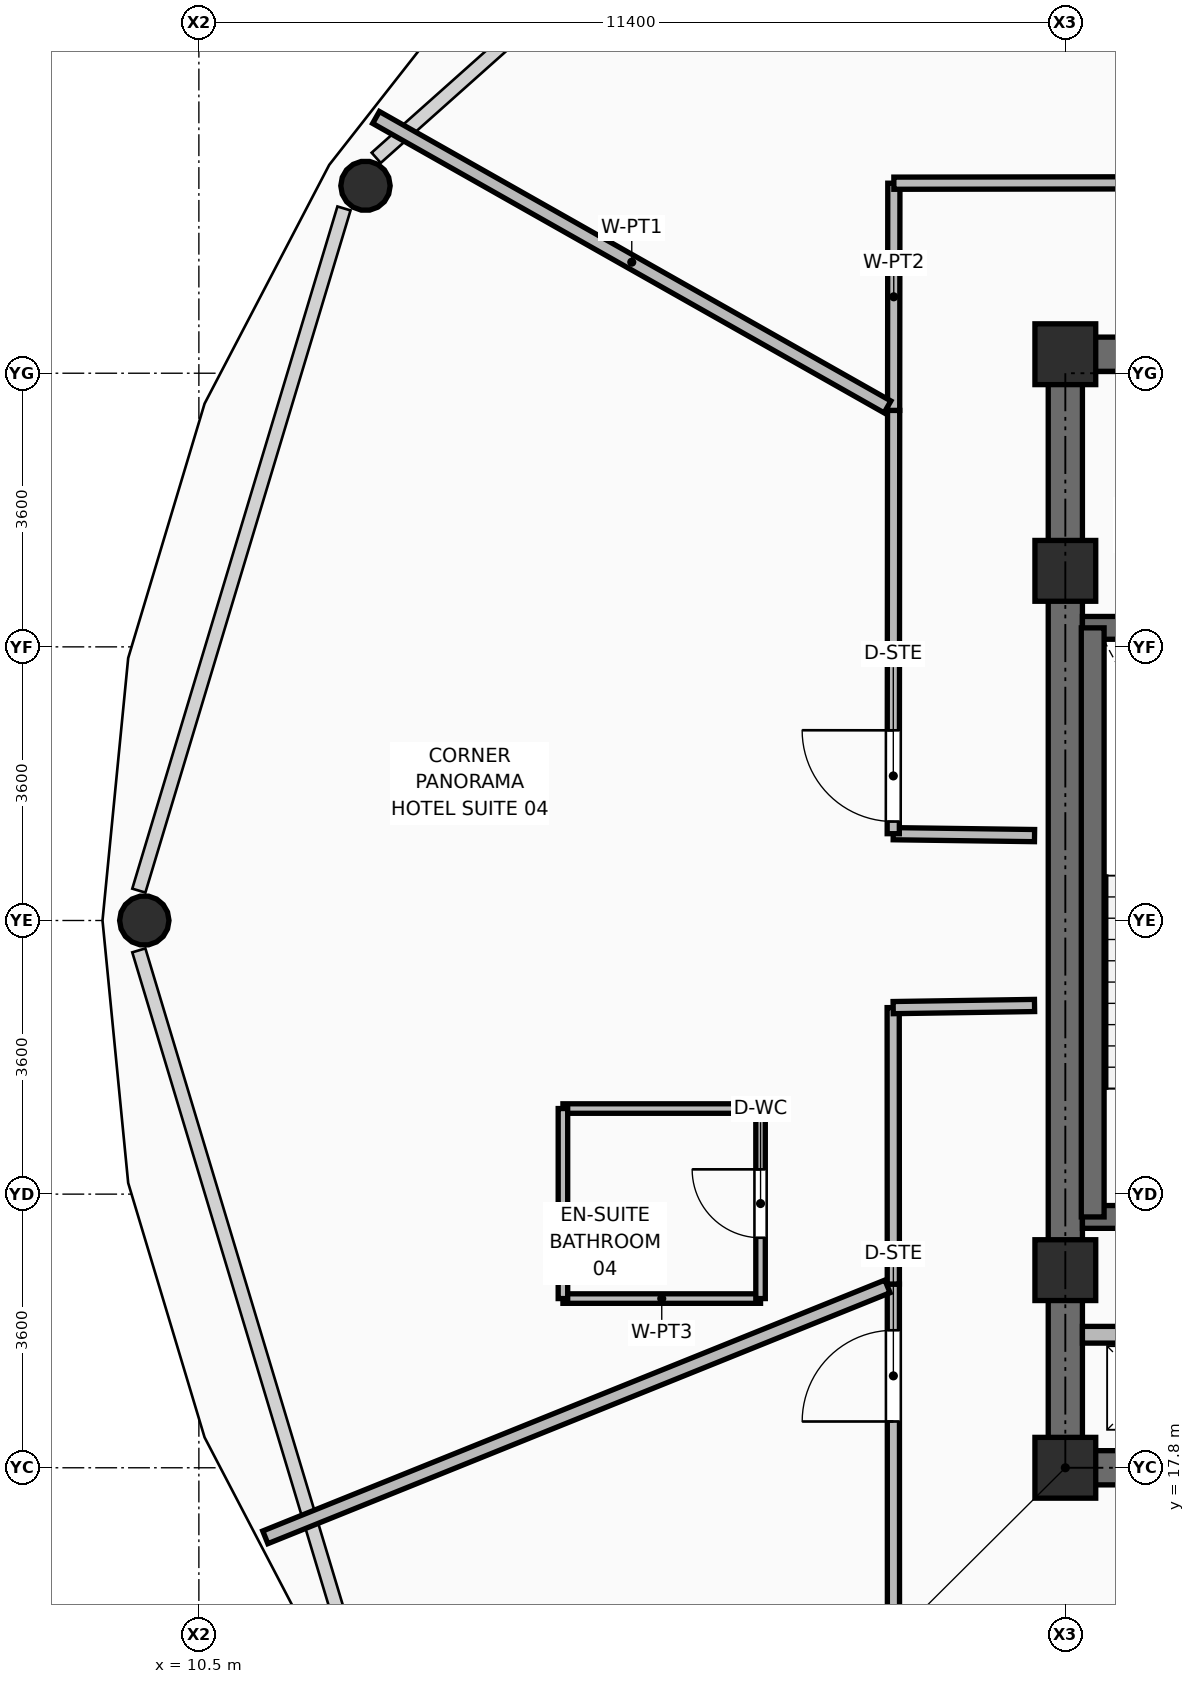
"""IFC4 building model, lengths in metres.
Left out: names, types, materials, properties, quantities, classifications, styles, units other than length and angle.
Written with IfcOpenShell. Run it as: python <this file> out.ifc"""

import sys

from ifc_helpers import new_model, si_unit, direction, frame, frame_2d, origin, origin_2d, place, context, subcontext, project, spatial, rectangle, hollow_circle, extrude, element, fill, save


model = new_model("IFC4")
c1 = context("Model", 3, precision=1e-05, world=origin(), true_north=direction((0.0, 1.0)))
c2 = subcontext(c1, "Body", "Model", "MODEL_VIEW")
j1 = project(units=[si_unit("LENGTHUNIT", "METRE"), si_unit("PLANEANGLEUNIT", "RADIAN")], contexts=[c1])
p1 = place(None, origin())
s1 = spatial("IfcSite", under=j1, at=p1, CompositionType="ELEMENT")
p2 = place(p1, origin())
s2 = spatial("IfcBuilding", under=s1, at=p2, CompositionType="ELEMENT")
p3 = place(p2, frame((0.0, 0.0, 242.4)))
s3 = spatial("IfcBuildingStorey", under=s2, at=p3, CompositionType="ELEMENT", Elevation=242.4)
for number, where, z_axis, x_axis in (
    (1, (21.9, 17.8, 0.0), (0.0, 0.0, 1.0), (1.0, 0.0, 0.0)),
    (2, (21.9, 20.4, 0.0), (0.0, 0.0, 1.0), (1.0, 0.0, 0.0)),
    (3, (21.9, 29.6, 0.0), (0.0, 0.0, 1.0), (1.0, 0.0, 0.0)),
    (4, (21.9, 32.45, 0.0), (0.0, 0.0, 1.0), (1.0, 0.0, 0.0)),
):
    element("IfcColumn", number, at=place(p3, frame(where, z_axis=z_axis, x_axis=x_axis)), inside=s3, PredefinedType="COLUMN", context=c2, shape_type="SweptSolid", body=[
        extrude(rectangle(XDim=0.8, YDim=0.8, at=origin_2d()), origin(), (0.0, 0.0, 1.0), 3.75),
    ])
for number, where, z_axis, x_axis in (
    (5, (12.692, 34.666, 0.0), (0.0, 0.0, 1.0), (1.0, 0.0, 0.0)),
    (6, (9.782, 25.0, 0.0), (0.0, 0.0, 1.0), (1.0, 0.0, 0.0)),
):
    element("IfcColumn", number, at=place(p3, frame(where, z_axis=z_axis, x_axis=x_axis)), inside=s3, PredefinedType="COLUMN", context=c2, shape_type="SweptSolid", body=[
        extrude(hollow_circle(Radius=0.325, WallThickness=0.03, at=origin_2d()), origin(), (0.0, 0.0, 1.0), 3.57),
    ])
p4 = place(p3, frame((21.675, 17.8, 0.0), z_axis=(0.0, 0.0, 1.0), x_axis=(1.0, 0.0, 0.0)))
e7 = element("IfcWall", 7, at=p4, inside=s3, PredefinedType="SHEAR", context=c2, shape_type="SweptSolid", body=[
    extrude(rectangle(XDim=2.075, YDim=0.45, at=frame_2d((1.038, 0.0))), origin(), (0.0, 0.0, 1.0), 3.57),
])
p5 = place(p3, frame((21.675, 32.45, 0.0), z_axis=(0.0, 0.0, 1.0), x_axis=(1.0, 0.0, 0.0)))
e8 = element("IfcWall", 8, at=p5, inside=s3, PredefinedType="SHEAR", context=c2, shape_type="SweptSolid", body=[
    extrude(rectangle(XDim=19.65, YDim=0.45, at=frame_2d((9.825, 0.0))), origin(), (0.0, 0.0, 1.0), 3.57),
])
p6 = place(p5, frame((2.075, 0.0, 0.0)))
e9 = element("IfcOpeningElement", 9, at=p6, cuts=e8, PredefinedType="OPENING", context=c2, shape_type="SweptSolid", body=[
    extrude(rectangle(XDim=1.1, YDim=2.1, at=frame_2d((0.55, 1.05))), frame((0.0, 0.235, 0.0), z_axis=(0.0, -1.0, 0.0), x_axis=(1.0, 0.0, 0.0)), (0.0, 0.0, 1.0), 0.47),
])
p7 = place(p5, frame((15.465, 0.0, 0.0)))
e10 = element("IfcOpeningElement", 10, at=p7, cuts=e8, PredefinedType="OPENING", context=c2, shape_type="SweptSolid", body=[
    extrude(rectangle(XDim=1.0, YDim=2.1, at=frame_2d((0.5, 1.05))), frame((0.0, 0.235, 0.0), z_axis=(0.0, -1.0, 0.0), x_axis=(1.0, 0.0, 0.0)), (0.0, 0.0, 1.0), 0.47),
])
p8 = place(p5, frame((17.475, 0.0, 0.0)))
e11 = element("IfcOpeningElement", 11, at=p8, cuts=e8, PredefinedType="OPENING", context=c2, shape_type="SweptSolid", body=[
    extrude(rectangle(XDim=0.9, YDim=2.1, at=frame_2d((0.45, 1.05))), frame((0.0, 0.235, 0.0), z_axis=(0.0, -1.0, 0.0), x_axis=(1.0, 0.0, 0.0)), (0.0, 0.0, 1.0), 0.47),
])
p9 = place(p3, frame((21.9, 18.025, 0.0), z_axis=(0.0, 0.0, 1.0), x_axis=(0.0, 1.0, 0.0)))
e12 = element("IfcWall", 12, at=p9, inside=s3, PredefinedType="SHEAR", context=c2, shape_type="SweptSolid", body=[
    extrude(rectangle(XDim=14.2, YDim=0.45, at=frame_2d((7.1, 0.0))), origin(), (0.0, 0.0, 1.0), 3.57),
])
p10 = place(p3, frame((22.125, 21.1, 0.0), z_axis=(0.0, 0.0, 1.0), x_axis=(1.0, 0.0, 0.0)))
e13 = element("IfcWall", 13, at=p10, inside=s3, PredefinedType="SHEAR", context=c2, shape_type="SweptSolid", body=[
    extrude(rectangle(XDim=3.615, YDim=0.3, at=frame_2d((1.808, 0.0))), origin(), (0.0, 0.0, 1.0), 3.57),
])
p11 = place(p10, frame((2.095, 0.0, 0.0)))
e14 = element("IfcOpeningElement", 14, at=p11, cuts=e13, PredefinedType="OPENING", context=c2, shape_type="SweptSolid", body=[
    extrude(rectangle(XDim=1.05, YDim=2.1, at=frame_2d((0.525, 1.05))), frame((0.0, 0.16, 0.0), z_axis=(0.0, -1.0, 0.0), x_axis=(1.0, 0.0, 0.0)), (0.0, 0.0, 1.0), 0.32),
])
p12 = place(p3, frame((22.125, 28.85, 0.0), z_axis=(0.0, 0.0, 1.0), x_axis=(1.0, 0.0, 0.0)))
e15 = element("IfcWall", 15, at=p12, inside=s3, PredefinedType="SHEAR", context=c2, shape_type="SweptSolid", body=[
    extrude(rectangle(XDim=3.615, YDim=0.3, at=frame_2d((1.808, 0.0))), origin(), (0.0, 0.0, 1.0), 3.57),
])
p13 = place(p3, frame((22.26, 21.1, 0.0), z_axis=(0.0, 0.0, 1.0), x_axis=(0.0, 1.0, 0.0)))
e16 = element("IfcWall", 16, at=p13, inside=s3, PredefinedType="SHEAR", context=c2, shape_type="SweptSolid", body=[
    extrude(rectangle(XDim=7.75, YDim=0.3, at=frame_2d((3.875, 0.0))), origin(), (0.0, 0.0, 1.0), 3.57),
])
p14 = place(p3, frame((22.125, 19.55, 0.0), z_axis=(0.0, 0.0, 1.0), x_axis=(1.0, 0.0, 0.0)))
e17 = element("IfcWall", 17, at=p14, inside=s3, PredefinedType="PARTITIONING", context=c2, shape_type="SweptSolid", body=[
    extrude(rectangle(XDim=1.665, YDim=0.22, at=frame_2d((0.833, 0.0))), origin(), (0.0, 0.0, 1.0), 2.595),
])
p15 = place(p3, frame((21.495, 26.117, 0.0), z_axis=(0.0, 0.0, 1.0), x_axis=(-0.999908537082, 0.013524698532, 0.0)))
e18 = element("IfcWall", 18, at=p15, inside=s3, PredefinedType="PARTITIONING", context=c2, shape_type="SweptSolid", body=[
    extrude(rectangle(XDim=1.859, YDim=0.16, at=frame_2d((0.93, 0.0))), origin(), (0.0, 0.0, 1.0), 2.595),
])
p16 = place(p3, frame((19.636, 26.142, 0.0), z_axis=(0.0, 0.0, 1.0), x_axis=(0.000920648448, 0.999999576203, 0.0)))
e19 = element("IfcWall", 19, at=p16, inside=s3, PredefinedType="PARTITIONING", context=c2, shape_type="SweptSolid", body=[
    extrude(rectangle(XDim=5.569, YDim=0.16, at=frame_2d((2.784, 0.0))), origin(), (0.0, 0.0, 1.0), 3.55),
])
p17 = place(p16, frame((0.16, 0.0, 0.0)))
e20 = element("IfcOpeningElement", 20, at=p17, cuts=e19, PredefinedType="OPENING", context=c2, shape_type="SweptSolid", body=[
    extrude(rectangle(XDim=1.2, YDim=2.1, at=frame_2d((0.6, 1.05))), frame((0.0, 0.09, 0.0), z_axis=(0.0, -1.0, 0.0), x_axis=(1.0, 0.0, 0.0)), (0.0, 0.0, 1.0), 0.18),
])
p18 = place(p3, frame((19.641, 31.711, 0.0), z_axis=(0.0, 0.0, 1.0), x_axis=(0.000980151453, 0.999999519651, 0.0)))
e21 = element("IfcWall", 21, at=p18, inside=s3, PredefinedType="PARTITIONING", context=c2, shape_type="SweptSolid", body=[
    extrude(rectangle(XDim=2.989, YDim=0.16, at=frame_2d((1.495, 0.0))), origin(), (0.0, 0.0, 1.0), 3.081),
])
p19 = place(p3, frame((19.644, 34.7, 0.0), z_axis=(0.0, 0.0, 1.0), x_axis=(0.999998989417, 0.001421677005, 0.0)))
e22 = element("IfcWall", 22, at=p19, inside=s3, PredefinedType="PARTITIONING", context=c2, shape_type="SweptSolid", body=[
    extrude(rectangle(XDim=5.667, YDim=0.16, at=frame_2d((2.833, 0.0))), origin(), (0.0, 0.0, 1.0), 3.081),
])
p20 = place(p19, frame((3.863, 0.0, 0.0)))
e23 = element("IfcOpeningElement", 23, at=p20, cuts=e22, PredefinedType="OPENING", context=c2, shape_type="SweptSolid", body=[
    extrude(rectangle(XDim=1.2, YDim=2.1, at=frame_2d((0.6, 1.05))), frame((0.0, 0.09, 0.0), z_axis=(0.0, -1.0, 0.0), x_axis=(1.0, 0.0, 0.0)), (0.0, 0.0, 1.0), 0.18),
])
p21 = place(p3, frame((19.64, 12.271, 0.0), z_axis=(0.0, 0.0, 1.0), x_axis=(-0.000368697551, 0.999999932031, 0.0)))
e24 = element("IfcWall", 24, at=p21, inside=s3, PredefinedType="PARTITIONING", context=c2, shape_type="SweptSolid", body=[
    extrude(rectangle(XDim=7.946, YDim=0.16, at=frame_2d((3.973, 0.0))), origin(), (0.0, 0.0, 1.0), 3.081),
])
p22 = place(p21, frame((6.138, 0.0, 0.0)))
e25 = element("IfcOpeningElement", 25, at=p22, cuts=e24, PredefinedType="OPENING", context=c2, shape_type="SweptSolid", body=[
    extrude(rectangle(XDim=1.2, YDim=2.1, at=frame_2d((0.6, 1.05))), frame((0.0, 0.09, 0.0), z_axis=(0.0, -1.0, 0.0), x_axis=(1.0, 0.0, 0.0)), (0.0, 0.0, 1.0), 0.18),
])
p23 = place(p3, frame((19.637, 20.217, 0.0), z_axis=(0.0, 0.0, 1.0), x_axis=(-0.000537020799, 0.999999855804, 0.0)))
e26 = element("IfcWall", 26, at=p23, inside=s3, PredefinedType="PARTITIONING", context=c2, shape_type="SweptSolid", body=[
    extrude(rectangle(XDim=3.637, YDim=0.16, at=frame_2d((1.818, 0.0))), origin(), (0.0, 0.0, 1.0), 3.081),
])
p24 = place(p3, frame((19.635, 23.854, 0.0), z_axis=(0.0, 0.0, 1.0), x_axis=(0.999886107392, 0.015092125259, 0.0)))
e27 = element("IfcWall", 27, at=p24, inside=s3, PredefinedType="PARTITIONING", context=c2, shape_type="SweptSolid", body=[
    extrude(rectangle(XDim=1.86, YDim=0.16, at=frame_2d((0.93, 0.0))), origin(), (0.0, 0.0, 1.0), 2.595),
])
p25 = place(p3, frame((25.259, 34.79, 0.0), z_axis=(0.0, 0.0, 1.0), x_axis=(-0.537619190812, 0.843187764185, 0.0)))
e28 = element("IfcWall", 28, at=p25, inside=s3, PredefinedType="PARTITIONING", context=c2, shape_type="SweptSolid", body=[
    extrude(rectangle(XDim=8.77, YDim=0.18, at=frame_2d((4.385, 0.0))), origin(), (0.0, 0.0, 1.0), 2.925),
])
p26 = place(p3, frame((19.56, 31.757, 0.0), z_axis=(0.0, 0.0, 1.0), x_axis=(-0.870312783113, 0.492499400559, 0.0)))
e29 = element("IfcWall", 29, at=p26, inside=s3, PredefinedType="PARTITIONING", context=c2, shape_type="SweptSolid", body=[
    extrude(rectangle(XDim=7.732, YDim=0.18, at=frame_2d((3.866, 0.0))), origin(), (0.0, 0.0, 1.0), 2.925),
])
p27 = place(p3, frame((19.56, 20.186, 0.0), z_axis=(0.0, 0.0, 1.0), x_axis=(-0.927433425778, -0.37398828959, 0.0)))
e30 = element("IfcWall", 30, at=p27, inside=s3, PredefinedType="PARTITIONING", context=c2, shape_type="SweptSolid", body=[
    extrude(rectangle(XDim=8.827, YDim=0.18, at=frame_2d((4.413, 0.0))), origin(), (0.0, 0.0, 1.0), 2.925),
])
p28 = place(p3, frame((15.29, 20.026, 0.0), z_axis=(0.0, 0.0, 1.0), x_axis=(1.0, 0.0, 0.0)))
e31 = element("IfcWall", 31, at=p28, inside=s3, PredefinedType="PARTITIONING", context=c2, shape_type="SweptSolid", body=[
    extrude(rectangle(XDim=2.6, YDim=0.125, at=frame_2d((1.3, 0.0))), origin(), (0.0, 0.0, 1.0), 3.55),
])
p29 = place(p3, frame((15.29, 22.526, 0.0), z_axis=(0.0, 0.0, 1.0), x_axis=(1.0, 0.0, 0.0)))
e32 = element("IfcWall", 32, at=p29, inside=s3, PredefinedType="PARTITIONING", context=c2, shape_type="SweptSolid", body=[
    extrude(rectangle(XDim=2.6, YDim=0.125, at=frame_2d((1.3, 0.0))), origin(), (0.0, 0.0, 1.0), 3.081),
])
p30 = place(p3, frame((15.29, 20.026, 0.0), z_axis=(0.0, 0.0, 1.0), x_axis=(0.0, 1.0, 0.0)))
e33 = element("IfcWall", 33, at=p30, inside=s3, PredefinedType="PARTITIONING", context=c2, shape_type="SweptSolid", body=[
    extrude(rectangle(XDim=2.5, YDim=0.125, at=frame_2d((1.25, 0.0))), origin(), (0.0, 0.0, 1.0), 3.55),
])
p31 = place(p3, frame((17.89, 20.026, 0.0), z_axis=(0.0, 0.0, 1.0), x_axis=(0.0, 1.0, 0.0)))
e34 = element("IfcWall", 34, at=p31, inside=s3, PredefinedType="PARTITIONING", context=c2, shape_type="SweptSolid", body=[
    extrude(rectangle(XDim=2.5, YDim=0.125, at=frame_2d((1.25, 0.0))), origin(), (0.0, 0.0, 1.0), 3.081),
])
p32 = place(p31, frame((0.8, 0.0, 0.0)))
e35 = element("IfcOpeningElement", 35, at=p32, cuts=e34, PredefinedType="OPENING", context=c2, shape_type="SweptSolid", body=[
    extrude(rectangle(XDim=0.9, YDim=2.1, at=frame_2d((0.45, 1.05))), frame((0.0, 0.073, 0.0), z_axis=(0.0, -1.0, 0.0), x_axis=(1.0, 0.0, 0.0)), (0.0, 0.0, 1.0), 0.145),
])
p33 = place(p32, origin())
e36 = element("IfcDoor", 36, at=p33, inside=s3, OperationType="SINGLE_SWING_RIGHT", PredefinedType="DOOR", context=c2, shape_type="SweptSolid", body=[
    extrude(rectangle(XDim=0.9, YDim=2.1, at=frame_2d((0.45, 1.05))), frame((0.0, 0.025, 0.0), z_axis=(0.0, -1.0, 0.0), x_axis=(1.0, 0.0, 0.0)), (0.0, 0.0, 1.0), 0.05),
])
fill(e35, e36)
p34 = place(p17, origin())
e37 = element("IfcDoor", 37, at=p34, inside=s3, OperationType="SINGLE_SWING_RIGHT", PredefinedType="DOOR", context=c2, shape_type="SweptSolid", body=[
    extrude(rectangle(XDim=1.2, YDim=2.1, at=frame_2d((0.6, 1.05))), frame((0.0, 0.025, 0.0), z_axis=(0.0, -1.0, 0.0), x_axis=(1.0, 0.0, 0.0)), (0.0, 0.0, 1.0), 0.05),
])
fill(e20, e37)
p35 = place(p22, origin())
e38 = element("IfcDoor", 38, at=p35, inside=s3, OperationType="SINGLE_SWING_LEFT", PredefinedType="DOOR", context=c2, shape_type="SweptSolid", body=[
    extrude(rectangle(XDim=1.2, YDim=2.1, at=frame_2d((0.6, 1.05))), frame((0.0, 0.025, 0.0), z_axis=(0.0, -1.0, 0.0), x_axis=(1.0, 0.0, 0.0)), (0.0, 0.0, 1.0), 0.05),
])
fill(e25, e38)
save(model, sys.argv[1])
